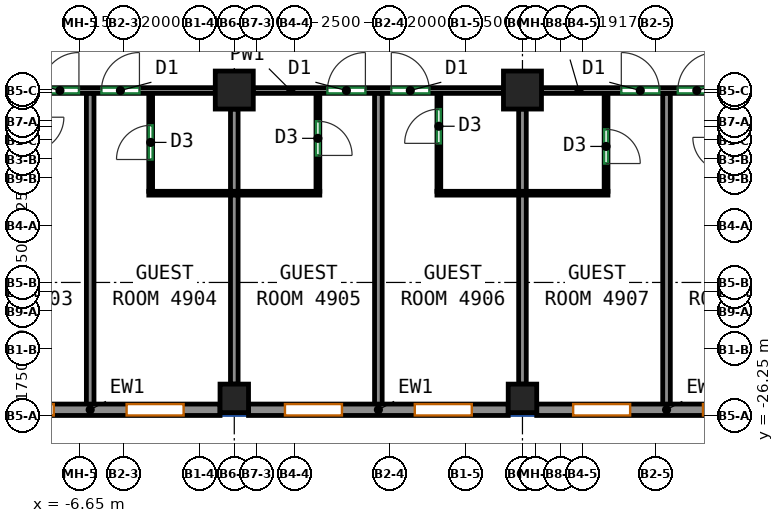
"""IFC4 building model, lengths in metres.
Left out: names, types, materials, properties, quantities, classifications, styles, units other than length and angle.
Written with IfcOpenShell. Run it as: python <this file> out.ifc"""

import sys

from ifc_helpers import new_model, si_unit, direction, frame, frame_2d, origin, origin_2d, place, context, subcontext, project, spatial, rectangle, extrude, source, transform, mapped, element, fill, save


model = new_model("IFC4")
c1 = context("Model", 3, precision=1e-05, world=origin(), true_north=direction((0.0, 1.0)))
c2 = subcontext(c1, "Body", "Model", "MODEL_VIEW")
j1 = project(units=[si_unit("LENGTHUNIT", "METRE"), si_unit("PLANEANGLEUNIT", "RADIAN")], contexts=[c1])
p1 = place(None, origin())
s1 = spatial("IfcSite", under=j1, at=p1, CompositionType="ELEMENT")
p2 = place(p1, origin())
s2 = spatial("IfcBuilding", under=s1, at=p2, CompositionType="ELEMENT")
p3 = place(p2, frame((0.0, 0.0, 203.3)))
s3 = spatial("IfcBuildingStorey", under=s2, at=p3, CompositionType="ELEMENT", Elevation=203.3)
m1 = source(origin(), c2, "Body", "SweptSolid", [
    extrude(rectangle(XDim=0.75, YDim=0.75, at=origin_2d()), origin(), (0.0, 0.0, 1.0), 3.12),
])
p4 = place(p3, frame((-2.583, -25.8, 0.0), z_axis=(0.0, 0.0, 1.0), x_axis=(1.0, 0.0, 0.0)))
e1 = element("IfcColumn", 1, at=p4, inside=s3, PredefinedType="COLUMN", context=c2, shape_type="MappedRepresentation", body=[
    mapped(m1, transform((0.0, 0.0, 0.0))),
])
m2 = source(origin(), c2, "Body", "SweptSolid", [
    extrude(rectangle(XDim=1.0, YDim=1.0, at=origin_2d()), origin(), (0.0, 0.0, 1.0), 3.12),
])
p5 = place(p3, frame((-2.583, -17.688, 0.0), z_axis=(0.0, 0.0, 1.0), x_axis=(1.0, 0.0, 0.0)))
e2 = element("IfcColumn", 2, at=p5, inside=s3, PredefinedType="COLUMN", context=c2, shape_type="MappedRepresentation", body=[
    mapped(m2, transform((0.0, 0.0, 0.0))),
])
p6 = place(p3, frame((5.0, -25.8, 0.0), z_axis=(0.0, 0.0, 1.0), x_axis=(1.0, 0.0, 0.0)))
e3 = element("IfcColumn", 3, at=p6, inside=s3, PredefinedType="COLUMN", context=c2, shape_type="MappedRepresentation", body=[
    mapped(m1, transform((0.0, 0.0, 0.0))),
])
p7 = place(p3, frame((5.0, -17.688, 0.0), z_axis=(0.0, 0.0, 1.0), x_axis=(1.0, 0.0, 0.0)))
e4 = element("IfcColumn", 4, at=p7, inside=s3, PredefinedType="COLUMN", context=c2, shape_type="MappedRepresentation", body=[
    mapped(m2, transform((0.0, 0.0, 0.0))),
])
m3 = source(origin(), c2, "Body", "SweptSolid", [
    extrude(rectangle(XDim=6.833, YDim=0.3, at=frame_2d((3.417, 0.0))), origin(), (0.0, 0.0, 1.0), 3.12),
])
p8 = place(p3, frame((-9.792, -26.1, 0.0), z_axis=(0.0, 0.0, 1.0), x_axis=(1.0, 0.0, 0.0)))
e5 = element("IfcWall", 5, at=p8, inside=s3, PredefinedType="SOLIDWALL", context=c2, shape_type="MappedRepresentation", body=[
    mapped(m3, transform((0.0, 0.0, 0.0))),
])
p9 = place(p8, frame((0.958, 0.0, 0.85)))
e6 = element("IfcOpeningElement", 6, at=p9, cuts=e5, PredefinedType="OPENING", context=c2, shape_type="SweptSolid", body=[
    extrude(rectangle(XDim=1.5, YDim=1.95, at=frame_2d((0.75, 0.975))), frame((0.0, 0.16, 0.0), z_axis=(0.0, -1.0, 0.0), x_axis=(1.0, 0.0, 0.0)), (0.0, 0.0, 1.0), 0.32),
])
p10 = place(p8, frame((4.375, 0.0, 0.85)))
e7 = element("IfcOpeningElement", 7, at=p10, cuts=e5, PredefinedType="OPENING", context=c2, shape_type="SweptSolid", body=[
    extrude(rectangle(XDim=1.5, YDim=1.95, at=frame_2d((0.75, 0.975))), frame((0.0, 0.16, 0.0), z_axis=(0.0, -1.0, 0.0), x_axis=(1.0, 0.0, 0.0)), (0.0, 0.0, 1.0), 0.32),
])
m4 = source(origin(), c2, "Body", "SweptSolid", [
    extrude(rectangle(XDim=6.833, YDim=0.3, at=frame_2d((3.417, 0.0))), origin(), (0.0, 0.0, 1.0), 3.12),
])
p11 = place(p3, frame((-2.208, -26.1, 0.0), z_axis=(0.0, 0.0, 1.0), x_axis=(1.0, 0.0, 0.0)))
e8 = element("IfcWall", 8, at=p11, inside=s3, PredefinedType="SOLIDWALL", context=c2, shape_type="MappedRepresentation", body=[
    mapped(m4, transform((0.0, 0.0, 0.0))),
])
p12 = place(p11, frame((0.958, 0.0, 0.85)))
e9 = element("IfcOpeningElement", 9, at=p12, cuts=e8, PredefinedType="OPENING", context=c2, shape_type="SweptSolid", body=[
    extrude(rectangle(XDim=1.5, YDim=1.95, at=frame_2d((0.75, 0.975))), frame((0.0, 0.16, 0.0), z_axis=(0.0, -1.0, 0.0), x_axis=(1.0, 0.0, 0.0)), (0.0, 0.0, 1.0), 0.32),
])
p13 = place(p11, frame((4.375, 0.0, 0.85)))
e10 = element("IfcOpeningElement", 10, at=p13, cuts=e8, PredefinedType="OPENING", context=c2, shape_type="SweptSolid", body=[
    extrude(rectangle(XDim=1.5, YDim=1.95, at=frame_2d((0.75, 0.975))), frame((0.0, 0.16, 0.0), z_axis=(0.0, -1.0, 0.0), x_axis=(1.0, 0.0, 0.0)), (0.0, 0.0, 1.0), 0.32),
])
p14 = place(p3, frame((5.375, -26.1, 0.0), z_axis=(0.0, 0.0, 1.0), x_axis=(1.0, 0.0, 0.0)))
e11 = element("IfcWall", 11, at=p14, inside=s3, PredefinedType="SOLIDWALL", context=c2, shape_type="MappedRepresentation", body=[
    mapped(m4, transform((0.0, 0.0, 0.0))),
])
p15 = place(p14, frame((0.958, 0.0, 0.85)))
e12 = element("IfcOpeningElement", 12, at=p15, cuts=e11, PredefinedType="OPENING", context=c2, shape_type="SweptSolid", body=[
    extrude(rectangle(XDim=1.5, YDim=1.95, at=frame_2d((0.75, 0.975))), frame((0.0, 0.16, 0.0), z_axis=(0.0, -1.0, 0.0), x_axis=(1.0, 0.0, 0.0)), (0.0, 0.0, 1.0), 0.32),
])
p16 = place(p14, frame((4.375, 0.0, 0.85)))
e13 = element("IfcOpeningElement", 13, at=p16, cuts=e11, PredefinedType="OPENING", context=c2, shape_type="SweptSolid", body=[
    extrude(rectangle(XDim=1.5, YDim=1.95, at=frame_2d((0.75, 0.975))), frame((0.0, 0.16, 0.0), z_axis=(0.0, -1.0, 0.0), x_axis=(1.0, 0.0, 0.0)), (0.0, 0.0, 1.0), 0.32),
])
p17 = place(p3, frame((-9.667, -17.7, 0.0), z_axis=(0.0, 0.0, 1.0), x_axis=(1.0, 0.0, 0.0)))
e14 = element("IfcWall", 14, at=p17, inside=s3, PredefinedType="PARTITIONING", context=c2, shape_type="SweptSolid", body=[
    extrude(rectangle(XDim=6.584, YDim=0.15, at=frame_2d((3.292, 0.0))), origin(), (0.0, 0.0, 1.0), 3.12),
])
p18 = place(p17, frame((1.996, 0.0, 0.0)))
e15 = element("IfcOpeningElement", 15, at=p18, cuts=e14, PredefinedType="OPENING", context=c2, shape_type="SweptSolid", body=[
    extrude(rectangle(XDim=1.0, YDim=2.1, at=frame_2d((0.5, 1.05))), frame((0.0, 0.085, 0.0), z_axis=(0.0, -1.0, 0.0), x_axis=(1.0, 0.0, 0.0)), (0.0, 0.0, 1.0), 0.17),
])
p19 = place(p17, frame((3.588, 0.0, 0.0)))
e16 = element("IfcOpeningElement", 16, at=p19, cuts=e14, PredefinedType="OPENING", context=c2, shape_type="SweptSolid", body=[
    extrude(rectangle(XDim=1.0, YDim=2.1, at=frame_2d((0.5, 1.05))), frame((0.0, 0.085, 0.0), z_axis=(0.0, -1.0, 0.0), x_axis=(1.0, 0.0, 0.0)), (0.0, 0.0, 1.0), 0.17),
])
p20 = place(p3, frame((-2.083, -17.7, 0.0), z_axis=(0.0, 0.0, 1.0), x_axis=(1.0, 0.0, 0.0)))
e17 = element("IfcWall", 17, at=p20, inside=s3, PredefinedType="PARTITIONING", context=c2, shape_type="SweptSolid", body=[
    extrude(rectangle(XDim=6.583, YDim=0.15, at=frame_2d((3.292, 0.0))), origin(), (0.0, 0.0, 1.0), 3.12),
])
p21 = place(p20, frame((1.95, 0.0, 0.0)))
e18 = element("IfcOpeningElement", 18, at=p21, cuts=e17, PredefinedType="OPENING", context=c2, shape_type="SweptSolid", body=[
    extrude(rectangle(XDim=1.0, YDim=2.1, at=frame_2d((0.5, 1.05))), frame((0.0, 0.085, 0.0), z_axis=(0.0, -1.0, 0.0), x_axis=(1.0, 0.0, 0.0)), (0.0, 0.0, 1.0), 0.17),
])
p22 = place(p20, frame((3.632, 0.0, 0.0)))
e19 = element("IfcOpeningElement", 19, at=p22, cuts=e17, PredefinedType="OPENING", context=c2, shape_type="SweptSolid", body=[
    extrude(rectangle(XDim=1.0, YDim=2.1, at=frame_2d((0.5, 1.05))), frame((0.0, 0.085, 0.0), z_axis=(0.0, -1.0, 0.0), x_axis=(1.0, 0.0, 0.0)), (0.0, 0.0, 1.0), 0.17),
])
p23 = place(p3, frame((5.5, -17.7, 0.0), z_axis=(0.0, 0.0, 1.0), x_axis=(1.0, 0.0, 0.0)))
e20 = element("IfcWall", 20, at=p23, inside=s3, PredefinedType="PARTITIONING", context=c2, shape_type="SweptSolid", body=[
    extrude(rectangle(XDim=6.583, YDim=0.15, at=frame_2d((3.292, 0.0))), origin(), (0.0, 0.0, 1.0), 3.12),
])
p24 = place(p23, frame((2.101, 0.0, 0.0)))
e21 = element("IfcOpeningElement", 21, at=p24, cuts=e20, PredefinedType="OPENING", context=c2, shape_type="SweptSolid", body=[
    extrude(rectangle(XDim=1.0, YDim=2.1, at=frame_2d((0.5, 1.05))), frame((0.0, 0.085, 0.0), z_axis=(0.0, -1.0, 0.0), x_axis=(1.0, 0.0, 0.0)), (0.0, 0.0, 1.0), 0.17),
])
p25 = place(p23, frame((3.587, 0.0, 0.0)))
e22 = element("IfcOpeningElement", 22, at=p25, cuts=e20, PredefinedType="OPENING", context=c2, shape_type="SweptSolid", body=[
    extrude(rectangle(XDim=1.0, YDim=2.1, at=frame_2d((0.5, 1.05))), frame((0.0, 0.085, 0.0), z_axis=(0.0, -1.0, 0.0), x_axis=(1.0, 0.0, 0.0)), (0.0, 0.0, 1.0), 0.17),
])
p26 = place(p3, frame((-6.375, -26.0, 0.0), z_axis=(0.0, 0.0, 1.0), x_axis=(0.0, 1.0, 0.0)))
e23 = element("IfcWall", 23, at=p26, inside=s3, PredefinedType="PARTITIONING", context=c2, shape_type="SweptSolid", body=[
    extrude(rectangle(XDim=8.223, YDim=0.2, at=frame_2d((4.111, 0.0))), origin(), (0.0, 0.0, 1.0), 3.12),
])
p27 = place(p3, frame((-4.783, -20.352, 0.0), z_axis=(0.0, 0.0, 1.0), x_axis=(0.0, 1.0, 0.0)))
e24 = element("IfcWall", 24, at=p27, inside=s3, PredefinedType="PARTITIONING", context=c2, shape_type="SweptSolid", body=[
    extrude(rectangle(XDim=2.575, YDim=0.1, at=frame_2d((1.288, 0.0))), origin(), (0.0, 0.0, 1.0), 3.12),
])
p28 = place(p27, frame((0.837, 0.0, 0.0)))
e25 = element("IfcOpeningElement", 25, at=p28, cuts=e24, PredefinedType="OPENING", context=c2, shape_type="SweptSolid", body=[
    extrude(rectangle(XDim=0.9, YDim=2.1, at=frame_2d((0.45, 1.05))), frame((0.0, 0.06, 0.0), z_axis=(0.0, -1.0, 0.0), x_axis=(1.0, 0.0, 0.0)), (0.0, 0.0, 1.0), 0.12),
])
p29 = place(p3, frame((-4.833, -20.402, 0.0), z_axis=(0.0, 0.0, 1.0), x_axis=(1.0, 0.0, 0.0)))
e26 = element("IfcWall", 26, at=p29, inside=s3, PredefinedType="PARTITIONING", context=c2, shape_type="SweptSolid", body=[
    extrude(rectangle(XDim=4.5, YDim=0.1, at=frame_2d((2.25, 0.0))), origin(), (0.0, 0.0, 1.0), 3.12),
])
p30 = place(p3, frame((-2.583, -25.425, 0.0), z_axis=(0.0, 0.0, 1.0), x_axis=(0.0, 1.0, 0.0)))
e27 = element("IfcWall", 27, at=p30, inside=s3, PredefinedType="PARTITIONING", context=c2, shape_type="SweptSolid", body=[
    extrude(rectangle(XDim=4.973, YDim=0.2, at=frame_2d((2.487, 0.0))), origin(), (0.0, 0.0, 1.0), 3.12),
])
p31 = place(p3, frame((-2.583, -20.352, 0.0), z_axis=(0.0, 0.0, 1.0), x_axis=(0.0, 1.0, 0.0)))
e28 = element("IfcWall", 28, at=p31, inside=s3, PredefinedType="PARTITIONING", context=c2, shape_type="SweptSolid", body=[
    extrude(rectangle(XDim=2.164, YDim=0.2, at=frame_2d((1.082, 0.0))), origin(), (0.0, 0.0, 1.0), 3.12),
])
p32 = place(p3, frame((-0.383, -17.777, 0.0), z_axis=(0.0, 0.0, 1.0), x_axis=(0.0, -1.0, 0.0)))
e29 = element("IfcWall", 29, at=p32, inside=s3, PredefinedType="PARTITIONING", context=c2, shape_type="SweptSolid", body=[
    extrude(rectangle(XDim=2.575, YDim=0.1, at=frame_2d((1.288, 0.0))), origin(), (0.0, 0.0, 1.0), 3.12),
])
p33 = place(p32, frame((0.731, 0.0, 0.0)))
e30 = element("IfcOpeningElement", 30, at=p33, cuts=e29, PredefinedType="OPENING", context=c2, shape_type="SweptSolid", body=[
    extrude(rectangle(XDim=0.9, YDim=2.1, at=frame_2d((0.45, 1.05))), frame((0.0, 0.06, 0.0), z_axis=(0.0, -1.0, 0.0), x_axis=(1.0, 0.0, 0.0)), (0.0, 0.0, 1.0), 0.12),
])
p34 = place(p3, frame((1.208, -26.0, 0.0), z_axis=(0.0, 0.0, 1.0), x_axis=(0.0, 1.0, 0.0)))
e31 = element("IfcWall", 31, at=p34, inside=s3, PredefinedType="PARTITIONING", context=c2, shape_type="SweptSolid", body=[
    extrude(rectangle(XDim=8.223, YDim=0.2, at=frame_2d((4.111, 0.0))), origin(), (0.0, 0.0, 1.0), 3.12),
])
p35 = place(p3, frame((2.8, -20.352, 0.0), z_axis=(0.0, 0.0, 1.0), x_axis=(0.0, 1.0, 0.0)))
e32 = element("IfcWall", 32, at=p35, inside=s3, PredefinedType="PARTITIONING", context=c2, shape_type="SweptSolid", body=[
    extrude(rectangle(XDim=2.575, YDim=0.1, at=frame_2d((1.288, 0.0))), origin(), (0.0, 0.0, 1.0), 3.12),
])
p36 = place(p35, frame((1.262, 0.0, 0.0)))
e33 = element("IfcOpeningElement", 33, at=p36, cuts=e32, PredefinedType="OPENING", context=c2, shape_type="SweptSolid", body=[
    extrude(rectangle(XDim=0.9, YDim=2.1, at=frame_2d((0.45, 1.05))), frame((0.0, 0.06, 0.0), z_axis=(0.0, -1.0, 0.0), x_axis=(1.0, 0.0, 0.0)), (0.0, 0.0, 1.0), 0.12),
])
p37 = place(p3, frame((2.75, -20.402, 0.0), z_axis=(0.0, 0.0, 1.0), x_axis=(1.0, 0.0, 0.0)))
e34 = element("IfcWall", 34, at=p37, inside=s3, PredefinedType="PARTITIONING", context=c2, shape_type="SweptSolid", body=[
    extrude(rectangle(XDim=4.5, YDim=0.1, at=frame_2d((2.25, 0.0))), origin(), (0.0, 0.0, 1.0), 3.12),
])
p38 = place(p3, frame((5.0, -25.425, 0.0), z_axis=(0.0, 0.0, 1.0), x_axis=(0.0, 1.0, 0.0)))
e35 = element("IfcWall", 35, at=p38, inside=s3, PredefinedType="PARTITIONING", context=c2, shape_type="SweptSolid", body=[
    extrude(rectangle(XDim=4.973, YDim=0.2, at=frame_2d((2.487, 0.0))), origin(), (0.0, 0.0, 1.0), 3.12),
])
p39 = place(p3, frame((5.0, -20.352, 0.0), z_axis=(0.0, 0.0, 1.0), x_axis=(0.0, 1.0, 0.0)))
e36 = element("IfcWall", 36, at=p39, inside=s3, PredefinedType="PARTITIONING", context=c2, shape_type="SweptSolid", body=[
    extrude(rectangle(XDim=2.164, YDim=0.2, at=frame_2d((1.082, 0.0))), origin(), (0.0, 0.0, 1.0), 3.12),
])
p40 = place(p3, frame((7.2, -17.777, 0.0), z_axis=(0.0, 0.0, 1.0), x_axis=(0.0, -1.0, 0.0)))
e37 = element("IfcWall", 37, at=p40, inside=s3, PredefinedType="PARTITIONING", context=c2, shape_type="SweptSolid", body=[
    extrude(rectangle(XDim=2.575, YDim=0.1, at=frame_2d((1.288, 0.0))), origin(), (0.0, 0.0, 1.0), 3.12),
])
p41 = place(p40, frame((0.944, 0.0, 0.0)))
e38 = element("IfcOpeningElement", 38, at=p41, cuts=e37, PredefinedType="OPENING", context=c2, shape_type="SweptSolid", body=[
    extrude(rectangle(XDim=0.9, YDim=2.1, at=frame_2d((0.45, 1.05))), frame((0.0, 0.06, 0.0), z_axis=(0.0, -1.0, 0.0), x_axis=(1.0, 0.0, 0.0)), (0.0, 0.0, 1.0), 0.12),
])
p42 = place(p3, frame((8.791, -26.0, 0.0), z_axis=(0.0, 0.0, 1.0), x_axis=(0.0, 1.0, 0.0)))
e39 = element("IfcWall", 39, at=p42, inside=s3, PredefinedType="PARTITIONING", context=c2, shape_type="SweptSolid", body=[
    extrude(rectangle(XDim=8.223, YDim=0.2, at=frame_2d((4.111, 0.0))), origin(), (0.0, 0.0, 1.0), 3.12),
])
p43 = place(p9, origin())
e40 = element("IfcWindow", 40, at=p43, inside=s3, PartitioningType="SINGLE_PANEL", PredefinedType="WINDOW", context=c2, shape_type="SweptSolid", body=[
    extrude(rectangle(XDim=1.5, YDim=1.95, at=frame_2d((0.75, 0.975))), frame((0.0, 0.03, 0.0), z_axis=(0.0, -1.0, 0.0), x_axis=(1.0, 0.0, 0.0)), (0.0, 0.0, 1.0), 0.06),
])
fill(e6, e40)
p44 = place(p10, origin())
e41 = element("IfcWindow", 41, at=p44, inside=s3, PartitioningType="SINGLE_PANEL", PredefinedType="WINDOW", context=c2, shape_type="SweptSolid", body=[
    extrude(rectangle(XDim=1.5, YDim=1.95, at=frame_2d((0.75, 0.975))), frame((0.0, 0.03, 0.0), z_axis=(0.0, -1.0, 0.0), x_axis=(1.0, 0.0, 0.0)), (0.0, 0.0, 1.0), 0.06),
])
fill(e7, e41)
p45 = place(p12, origin())
e42 = element("IfcWindow", 42, at=p45, inside=s3, PartitioningType="SINGLE_PANEL", PredefinedType="WINDOW", context=c2, shape_type="SweptSolid", body=[
    extrude(rectangle(XDim=1.5, YDim=1.95, at=frame_2d((0.75, 0.975))), frame((0.0, 0.03, 0.0), z_axis=(0.0, -1.0, 0.0), x_axis=(1.0, 0.0, 0.0)), (0.0, 0.0, 1.0), 0.06),
])
fill(e9, e42)
p46 = place(p13, origin())
e43 = element("IfcWindow", 43, at=p46, inside=s3, PartitioningType="SINGLE_PANEL", PredefinedType="WINDOW", context=c2, shape_type="SweptSolid", body=[
    extrude(rectangle(XDim=1.5, YDim=1.95, at=frame_2d((0.75, 0.975))), frame((0.0, 0.03, 0.0), z_axis=(0.0, -1.0, 0.0), x_axis=(1.0, 0.0, 0.0)), (0.0, 0.0, 1.0), 0.06),
])
fill(e10, e43)
p47 = place(p15, origin())
e44 = element("IfcWindow", 44, at=p47, inside=s3, PartitioningType="SINGLE_PANEL", PredefinedType="WINDOW", context=c2, shape_type="SweptSolid", body=[
    extrude(rectangle(XDim=1.5, YDim=1.95, at=frame_2d((0.75, 0.975))), frame((0.0, 0.03, 0.0), z_axis=(0.0, -1.0, 0.0), x_axis=(1.0, 0.0, 0.0)), (0.0, 0.0, 1.0), 0.06),
])
fill(e12, e44)
p48 = place(p16, origin())
e45 = element("IfcWindow", 45, at=p48, inside=s3, PartitioningType="SINGLE_PANEL", PredefinedType="WINDOW", context=c2, shape_type="SweptSolid", body=[
    extrude(rectangle(XDim=1.5, YDim=1.95, at=frame_2d((0.75, 0.975))), frame((0.0, 0.03, 0.0), z_axis=(0.0, -1.0, 0.0), x_axis=(1.0, 0.0, 0.0)), (0.0, 0.0, 1.0), 0.06),
])
fill(e13, e45)
p49 = place(p41, origin())
e46 = element("IfcDoor", 46, at=p49, inside=s3, OperationType="SINGLE_SWING_RIGHT", PredefinedType="DOOR", context=c2, shape_type="SweptSolid", body=[
    extrude(rectangle(XDim=0.9, YDim=2.1, at=frame_2d((0.45, 1.05))), frame((0.0, 0.025, 0.0), z_axis=(0.0, -1.0, 0.0), x_axis=(1.0, 0.0, 0.0)), (0.0, 0.0, 1.0), 0.05),
])
fill(e38, e46)
p50 = place(p28, origin())
e47 = element("IfcDoor", 47, at=p50, inside=s3, OperationType="SINGLE_SWING_LEFT", PredefinedType="DOOR", context=c2, shape_type="SweptSolid", body=[
    extrude(rectangle(XDim=0.9, YDim=2.1, at=frame_2d((0.45, 1.05))), frame((0.0, 0.025, 0.0), z_axis=(0.0, -1.0, 0.0), x_axis=(1.0, 0.0, 0.0)), (0.0, 0.0, 1.0), 0.05),
])
fill(e25, e47)
p51 = place(p33, origin())
e48 = element("IfcDoor", 48, at=p51, inside=s3, OperationType="SINGLE_SWING_RIGHT", PredefinedType="DOOR", context=c2, shape_type="SweptSolid", body=[
    extrude(rectangle(XDim=0.9, YDim=2.1, at=frame_2d((0.45, 1.05))), frame((0.0, 0.025, 0.0), z_axis=(0.0, -1.0, 0.0), x_axis=(1.0, 0.0, 0.0)), (0.0, 0.0, 1.0), 0.05),
])
fill(e30, e48)
p52 = place(p36, origin())
e49 = element("IfcDoor", 49, at=p52, inside=s3, OperationType="SINGLE_SWING_LEFT", PredefinedType="DOOR", context=c2, shape_type="SweptSolid", body=[
    extrude(rectangle(XDim=0.9, YDim=2.1, at=frame_2d((0.45, 1.05))), frame((0.0, 0.025, 0.0), z_axis=(0.0, -1.0, 0.0), x_axis=(1.0, 0.0, 0.0)), (0.0, 0.0, 1.0), 0.05),
])
fill(e33, e49)
p53 = place(p18, origin())
e50 = element("IfcDoor", 50, at=p53, inside=s3, OperationType="SINGLE_SWING_RIGHT", PredefinedType="DOOR", context=c2, shape_type="SweptSolid", body=[
    extrude(rectangle(XDim=1.0, YDim=2.1, at=frame_2d((0.5, 1.05))), frame((0.0, 0.025, 0.0), z_axis=(0.0, -1.0, 0.0), x_axis=(1.0, 0.0, 0.0)), (0.0, 0.0, 1.0), 0.05),
])
fill(e15, e50)
p54 = place(p19, origin())
e51 = element("IfcDoor", 51, at=p54, inside=s3, OperationType="SINGLE_SWING_RIGHT", PredefinedType="DOOR", context=c2, shape_type="SweptSolid", body=[
    extrude(rectangle(XDim=1.0, YDim=2.1, at=frame_2d((0.5, 1.05))), frame((0.0, 0.025, 0.0), z_axis=(0.0, -1.0, 0.0), x_axis=(1.0, 0.0, 0.0)), (0.0, 0.0, 1.0), 0.05),
])
fill(e16, e51)
p55 = place(p21, origin())
e52 = element("IfcDoor", 52, at=p55, inside=s3, OperationType="SINGLE_SWING_RIGHT", PredefinedType="DOOR", context=c2, shape_type="SweptSolid", body=[
    extrude(rectangle(XDim=1.0, YDim=2.1, at=frame_2d((0.5, 1.05))), frame((0.0, 0.025, 0.0), z_axis=(0.0, -1.0, 0.0), x_axis=(1.0, 0.0, 0.0)), (0.0, 0.0, 1.0), 0.05),
])
fill(e18, e52)
p56 = place(p22, origin())
e53 = element("IfcDoor", 53, at=p56, inside=s3, OperationType="SINGLE_SWING_LEFT", PredefinedType="DOOR", context=c2, shape_type="SweptSolid", body=[
    extrude(rectangle(XDim=1.0, YDim=2.1, at=frame_2d((0.5, 1.05))), frame((0.0, 0.025, 0.0), z_axis=(0.0, -1.0, 0.0), x_axis=(1.0, 0.0, 0.0)), (0.0, 0.0, 1.0), 0.05),
])
fill(e19, e53)
p57 = place(p24, origin())
e54 = element("IfcDoor", 54, at=p57, inside=s3, OperationType="SINGLE_SWING_LEFT", PredefinedType="DOOR", context=c2, shape_type="SweptSolid", body=[
    extrude(rectangle(XDim=1.0, YDim=2.1, at=frame_2d((0.5, 1.05))), frame((0.0, 0.025, 0.0), z_axis=(0.0, -1.0, 0.0), x_axis=(1.0, 0.0, 0.0)), (0.0, 0.0, 1.0), 0.05),
])
fill(e21, e54)
p58 = place(p25, origin())
e55 = element("IfcDoor", 55, at=p58, inside=s3, OperationType="SINGLE_SWING_RIGHT", PredefinedType="DOOR", context=c2, shape_type="SweptSolid", body=[
    extrude(rectangle(XDim=1.0, YDim=2.1, at=frame_2d((0.5, 1.05))), frame((0.0, 0.025, 0.0), z_axis=(0.0, -1.0, 0.0), x_axis=(1.0, 0.0, 0.0)), (0.0, 0.0, 1.0), 0.05),
])
fill(e22, e55)
save(model, sys.argv[1])
